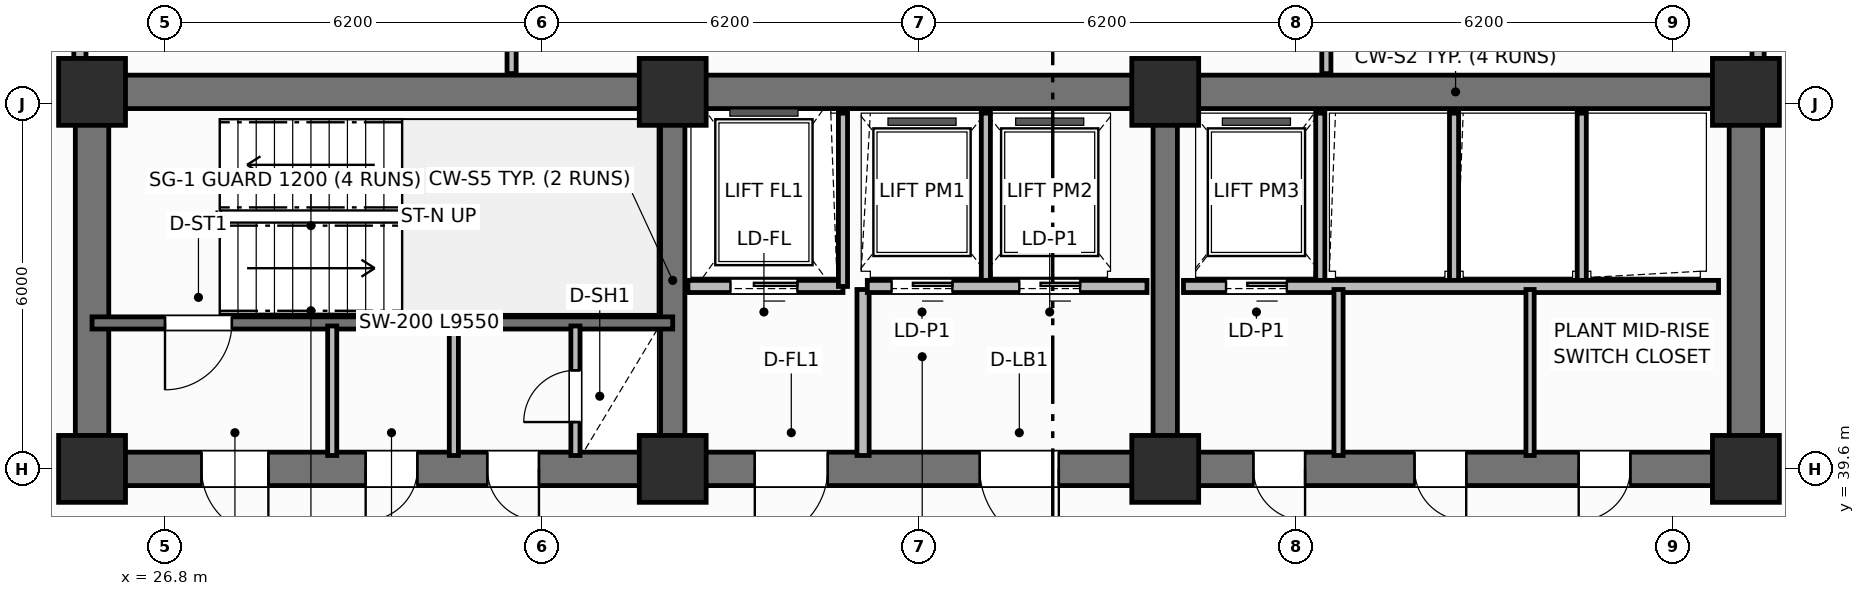
"""IFC4 building model, lengths in metres.
Left out: names, types, materials, properties, quantities, classifications, styles, units other than length and angle.
Written with IfcOpenShell. Run it as: python <this file> out.ifc"""

import sys

from ifc_helpers import new_model, si_unit, direction, frame, frame_2d, origin, origin_2d, place, context, subcontext, project, spatial, rectangle, extrude, element, fill, save


model = new_model("IFC4")
c1 = context("Model", 3, precision=1e-05, world=origin(), true_north=direction((0.0, 1.0)))
c2 = subcontext(c1, "Body", "Model", "MODEL_VIEW")
j1 = project(units=[si_unit("LENGTHUNIT", "METRE"), si_unit("PLANEANGLEUNIT", "RADIAN")], contexts=[c1])
p1 = place(None, origin())
s1 = spatial("IfcSite", under=j1, at=p1, CompositionType="ELEMENT")
p2 = place(p1, origin())
s2 = spatial("IfcBuilding", under=s1, at=p2, CompositionType="ELEMENT")
p3 = place(p2, frame((0.0, 0.0, 103.1)))
s3 = spatial("IfcBuildingStorey", under=s2, at=p3, CompositionType="ELEMENT", Elevation=103.1)
p4 = place(p3, frame((25.6, 45.8, 0.0), z_axis=(0.0, 0.0, 1.0), x_axis=(1.0, 0.0, 0.0)))
e1 = element("IfcWall", 1, at=p4, inside=s3, PredefinedType="SHEAR", context=c2, shape_type="SweptSolid", body=[
    extrude(rectangle(XDim=27.2, YDim=0.55, at=frame_2d((13.6, 0.0))), origin(), (0.0, 0.0, 1.0), 3.7),
])
for number, where, z_axis, x_axis in (
    (2, (25.6, 39.875, 0.0), (0.0, 0.0, 1.0), (0.0, 1.0, 0.0)),
    (3, (52.8, 39.875, 0.0), (0.0, 0.0, 1.0), (0.0, 1.0, 0.0)),
):
    element("IfcWall", number, at=place(p3, frame(where, z_axis=z_axis, x_axis=x_axis)), inside=s3, PredefinedType="SHEAR", context=c2, shape_type="SweptSolid", body=[
        extrude(rectangle(XDim=5.65, YDim=0.55, at=frame_2d((2.825, 0.0))), origin(), (0.0, 0.0, 1.0), 3.7),
    ])
p5 = place(p3, frame((52.8, 39.6, 0.0), z_axis=(0.0, 0.0, 1.0), x_axis=(-1.0, 0.0, 0.0)))
e4 = element("IfcWall", 4, at=p5, inside=s3, PredefinedType="SHEAR", context=c2, shape_type="SweptSolid", body=[
    extrude(rectangle(XDim=27.2, YDim=0.55, at=frame_2d((13.6, 0.0))), origin(), (0.0, 0.0, 1.0), 3.7),
])
p6 = place(p5, frame((24.3, 0.0, 0.0)))
e5 = element("IfcOpeningElement", 5, at=p6, cuts=e4, PredefinedType="OPENING", context=c2, shape_type="SweptSolid", body=[
    extrude(rectangle(XDim=1.1, YDim=2.15, at=frame_2d((0.55, 1.075))), frame((0.0, 0.285, 0.0), z_axis=(0.0, -1.0, 0.0), x_axis=(1.0, 0.0, 0.0)), (0.0, 0.0, 1.0), 0.57),
])
p7 = place(p5, frame((21.85, 0.0, 0.0)))
e6 = element("IfcOpeningElement", 6, at=p7, cuts=e4, PredefinedType="OPENING", context=c2, shape_type="SweptSolid", body=[
    extrude(rectangle(XDim=0.85, YDim=2.1, at=frame_2d((0.425, 1.05))), frame((0.0, 0.285, 0.0), z_axis=(0.0, -1.0, 0.0), x_axis=(1.0, 0.0, 0.0)), (0.0, 0.0, 1.0), 0.57),
])
p8 = place(p5, frame((19.85, 0.0, 0.0)))
e7 = element("IfcOpeningElement", 7, at=p8, cuts=e4, PredefinedType="OPENING", context=c2, shape_type="SweptSolid", body=[
    extrude(rectangle(XDim=0.85, YDim=2.1, at=frame_2d((0.425, 1.05))), frame((0.0, 0.285, 0.0), z_axis=(0.0, -1.0, 0.0), x_axis=(1.0, 0.0, 0.0)), (0.0, 0.0, 1.0), 0.57),
])
p9 = place(p5, frame((15.1, 0.0, 0.0)))
e8 = element("IfcOpeningElement", 8, at=p9, cuts=e4, PredefinedType="OPENING", context=c2, shape_type="SweptSolid", body=[
    extrude(rectangle(XDim=1.2, YDim=2.15, at=frame_2d((0.6, 1.075))), frame((0.0, 0.285, 0.0), z_axis=(0.0, -1.0, 0.0), x_axis=(1.0, 0.0, 0.0)), (0.0, 0.0, 1.0), 0.57),
])
p10 = place(p5, frame((11.3, 0.0, 0.0)))
e9 = element("IfcOpeningElement", 9, at=p10, cuts=e4, PredefinedType="OPENING", context=c2, shape_type="SweptSolid", body=[
    extrude(rectangle(XDim=1.3, YDim=2.2, at=frame_2d((0.65, 1.1))), frame((0.0, 0.285, 0.0), z_axis=(0.0, -1.0, 0.0), x_axis=(1.0, 0.0, 0.0)), (0.0, 0.0, 1.0), 0.57),
])
p11 = place(p5, frame((7.25, 0.0, 0.0)))
e10 = element("IfcOpeningElement", 10, at=p11, cuts=e4, PredefinedType="OPENING", context=c2, shape_type="SweptSolid", body=[
    extrude(rectangle(XDim=0.85, YDim=2.1, at=frame_2d((0.425, 1.05))), frame((0.0, 0.285, 0.0), z_axis=(0.0, -1.0, 0.0), x_axis=(1.0, 0.0, 0.0)), (0.0, 0.0, 1.0), 0.57),
])
p12 = place(p5, frame((4.6, 0.0, 0.0)))
e11 = element("IfcOpeningElement", 11, at=p12, cuts=e4, PredefinedType="OPENING", context=c2, shape_type="SweptSolid", body=[
    extrude(rectangle(XDim=0.85, YDim=2.1, at=frame_2d((0.425, 1.05))), frame((0.0, 0.285, 0.0), z_axis=(0.0, -1.0, 0.0), x_axis=(1.0, 0.0, 0.0)), (0.0, 0.0, 1.0), 0.57),
])
p13 = place(p5, frame((1.9, 0.0, 0.0)))
e12 = element("IfcOpeningElement", 12, at=p13, cuts=e4, PredefinedType="OPENING", context=c2, shape_type="SweptSolid", body=[
    extrude(rectangle(XDim=0.85, YDim=2.1, at=frame_2d((0.425, 1.05))), frame((0.0, 0.285, 0.0), z_axis=(0.0, -1.0, 0.0), x_axis=(1.0, 0.0, 0.0)), (0.0, 0.0, 1.0), 0.57),
])
for number, where, z_axis, x_axis in (
    (13, (35.15, 39.875, 0.0), (0.0, 0.0, 1.0), (0.0, 1.0, 0.0)),
    (14, (43.25, 39.875, 0.0), (0.0, 0.0, 1.0), (0.0, 1.0, 0.0)),
):
    element("IfcWall", number, at=place(p3, frame(where, z_axis=z_axis, x_axis=x_axis)), inside=s3, PredefinedType="SHEAR", context=c2, shape_type="SweptSolid", body=[
        extrude(rectangle(XDim=5.65, YDim=0.4, at=frame_2d((2.825, 0.0))), origin(), (0.0, 0.0, 1.0), 3.7),
    ])
for number, where, z_axis, x_axis in (
    (15, (25.6, 39.6, 0.0), (0.0, 0.0, 1.0), (1.0, 0.0, 0.0)),
    (16, (25.6, 45.8, 0.0), (0.0, 0.0, 1.0), (1.0, 0.0, 0.0)),
    (17, (35.15, 39.6, 0.0), (0.0, 0.0, 1.0), (1.0, 0.0, 0.0)),
    (18, (35.15, 45.8, 0.0), (0.0, 0.0, 1.0), (1.0, 0.0, 0.0)),
    (19, (43.25, 39.6, 0.0), (0.0, 0.0, 1.0), (1.0, 0.0, 0.0)),
    (20, (43.25, 45.8, 0.0), (0.0, 0.0, 1.0), (1.0, 0.0, 0.0)),
    (21, (52.8, 39.6, 0.0), (0.0, 0.0, 1.0), (1.0, 0.0, 0.0)),
    (22, (52.8, 45.8, 0.0), (0.0, 0.0, 1.0), (1.0, 0.0, 0.0)),
):
    element("IfcColumn", number, at=place(p3, frame(where, z_axis=z_axis, x_axis=x_axis)), inside=s3, PredefinedType="COLUMN", context=c2, shape_type="SweptSolid", body=[
        extrude(rectangle(XDim=1.1, YDim=1.1, at=origin_2d()), origin(), (0.0, 0.0, 1.0), 3.7),
    ])
p14 = place(p3, frame((35.15, 42.0, 0.0), z_axis=(0.0, 0.0, 1.0), x_axis=(-1.0, 0.0, 0.0)))
e23 = element("IfcWall", 23, at=p14, inside=s3, PredefinedType="SHEAR", context=c2, shape_type="SweptSolid", body=[
    extrude(rectangle(XDim=9.55, YDim=0.2, at=frame_2d((4.775, 0.0))), origin(), (0.0, 0.0, 1.0), 3.7),
])
p15 = place(p14, frame((7.25, 0.0, 0.0)))
e24 = element("IfcOpeningElement", 24, at=p15, cuts=e23, PredefinedType="OPENING", context=c2, shape_type="SweptSolid", body=[
    extrude(rectangle(XDim=1.1, YDim=2.15, at=frame_2d((0.55, 1.075))), frame((0.0, 0.11, 0.0), z_axis=(0.0, -1.0, 0.0), x_axis=(1.0, 0.0, 0.0)), (0.0, 0.0, 1.0), 0.22),
])
p16 = place(p3, frame((33.55, 39.82, 0.0), z_axis=(0.0, 0.0, 1.0), x_axis=(0.0, 1.0, 0.0)))
e25 = element("IfcWall", 25, at=p16, inside=s3, PredefinedType="PARTITIONING", context=c2, shape_type="SweptSolid", body=[
    extrude(rectangle(XDim=2.13, YDim=0.15, at=frame_2d((1.065, 0.0))), origin(), (0.0, 0.0, 1.0), 2.53),
])
p17 = place(p16, frame((0.55, 0.0, 0.0)))
e26 = element("IfcOpeningElement", 26, at=p17, cuts=e25, PredefinedType="OPENING", context=c2, shape_type="SweptSolid", body=[
    extrude(rectangle(XDim=0.85, YDim=2.05, at=frame_2d((0.425, 1.025))), frame((0.0, 0.085, 0.0), z_axis=(0.0, -1.0, 0.0), x_axis=(1.0, 0.0, 0.0)), (0.0, 0.0, 1.0), 0.17),
])
for number, where, z_axis, x_axis in (
    (27, (29.55, 39.82, 0.0), (0.0, 0.0, 1.0), (0.0, 1.0, 0.0)),
    (28, (31.55, 39.82, 0.0), (0.0, 0.0, 1.0), (0.0, 1.0, 0.0)),
):
    element("IfcWall", number, at=place(p3, frame(where, z_axis=z_axis, x_axis=x_axis)), inside=s3, PredefinedType="PARTITIONING", context=c2, shape_type="SweptSolid", body=[
        extrude(rectangle(XDim=2.13, YDim=0.15, at=frame_2d((1.065, 0.0))), origin(), (0.0, 0.0, 1.0), 2.53),
    ])
p18 = place(p3, frame((37.95, 42.6, 0.0), z_axis=(0.0, 0.0, 1.0), x_axis=(-1.0, 0.0, 0.0)))
e29 = element("IfcWall", 29, at=p18, inside=s3, PredefinedType="PARTITIONING", context=c2, shape_type="SweptSolid", body=[
    extrude(rectangle(XDim=2.55, YDim=0.2, at=frame_2d((1.275, 0.0))), origin(), (0.0, 0.0, 1.0), 2.3),
])
p19 = place(p18, frame((0.75, 0.0, 0.0)))
e30 = element("IfcOpeningElement", 30, at=p19, cuts=e29, PredefinedType="OPENING", context=c2, shape_type="SweptSolid", body=[
    extrude(rectangle(XDim=1.1, YDim=2.15, at=frame_2d((0.55, 1.075))), frame((0.0, 0.11, 0.0), z_axis=(0.0, -1.0, 0.0), x_axis=(1.0, 0.0, 0.0)), (0.0, 0.0, 1.0), 0.22),
])
p20 = place(p3, frame((37.95, 42.6, 0.0), z_axis=(0.0, 0.0, 1.0), x_axis=(0.0, 1.0, 0.0)))
e31 = element("IfcWall", 31, at=p20, inside=s3, PredefinedType="PARTITIONING", context=c2, shape_type="SweptSolid", body=[
    extrude(rectangle(XDim=2.85, YDim=0.15, at=frame_2d((1.425, 0.0))), origin(), (0.0, 0.0, 1.0), 2.53),
])
p21 = place(p3, frame((38.28, 39.82, 0.0), z_axis=(0.0, 0.0, 1.0), x_axis=(0.0, 1.0, 0.0)))
e32 = element("IfcWall", 32, at=p21, inside=s3, PredefinedType="PARTITIONING", context=c2, shape_type="SweptSolid", body=[
    extrude(rectangle(XDim=2.73, YDim=0.2, at=frame_2d((1.365, 0.0))), origin(), (0.0, 0.0, 1.0), 2.53),
])
p22 = place(p3, frame((40.3, 42.65, 0.0), z_axis=(0.0, 0.0, 1.0), x_axis=(0.0, 1.0, 0.0)))
e33 = element("IfcWall", 33, at=p22, inside=s3, PredefinedType="PARTITIONING", context=c2, shape_type="SweptSolid", body=[
    extrude(rectangle(XDim=2.8, YDim=0.15, at=frame_2d((1.4, 0.0))), origin(), (0.0, 0.0, 1.0), 2.53),
])
p23 = place(p3, frame((42.95, 42.6, 0.0), z_axis=(0.0, 0.0, 1.0), x_axis=(-1.0, 0.0, 0.0)))
e34 = element("IfcWall", 34, at=p23, inside=s3, PredefinedType="PARTITIONING", context=c2, shape_type="SweptSolid", body=[
    extrude(rectangle(XDim=4.6, YDim=0.2, at=frame_2d((2.3, 0.0))), origin(), (0.0, 0.0, 1.0), 2.3),
])
p24 = place(p23, frame((3.2, 0.0, 0.0)))
e35 = element("IfcOpeningElement", 35, at=p24, cuts=e34, PredefinedType="OPENING", context=c2, shape_type="SweptSolid", body=[
    extrude(rectangle(XDim=1.0, YDim=2.15, at=frame_2d((0.5, 1.075))), frame((0.0, 0.11, 0.0), z_axis=(0.0, -1.0, 0.0), x_axis=(1.0, 0.0, 0.0)), (0.0, 0.0, 1.0), 0.22),
])
p25 = place(p23, frame((1.1, 0.0, 0.0)))
e36 = element("IfcOpeningElement", 36, at=p25, cuts=e34, PredefinedType="OPENING", context=c2, shape_type="SweptSolid", body=[
    extrude(rectangle(XDim=1.0, YDim=2.15, at=frame_2d((0.5, 1.075))), frame((0.0, 0.11, 0.0), z_axis=(0.0, -1.0, 0.0), x_axis=(1.0, 0.0, 0.0)), (0.0, 0.0, 1.0), 0.22),
])
for number, where, z_axis, x_axis in (
    (37, (45.8, 42.65, 0.0), (0.0, 0.0, 1.0), (0.0, 1.0, 0.0)),
    (38, (48.0, 42.65, 0.0), (0.0, 0.0, 1.0), (0.0, 1.0, 0.0)),
    (39, (50.1, 42.65, 0.0), (0.0, 0.0, 1.0), (0.0, 1.0, 0.0)),
):
    element("IfcWall", number, at=place(p3, frame(where, z_axis=z_axis, x_axis=x_axis)), inside=s3, PredefinedType="PARTITIONING", context=c2, shape_type="SweptSolid", body=[
        extrude(rectangle(XDim=2.8, YDim=0.15, at=frame_2d((1.4, 0.0))), origin(), (0.0, 0.0, 1.0), 2.53),
    ])
p26 = place(p3, frame((52.35, 42.6, 0.0), z_axis=(0.0, 0.0, 1.0), x_axis=(-1.0, 0.0, 0.0)))
e40 = element("IfcWall", 40, at=p26, inside=s3, PredefinedType="PARTITIONING", context=c2, shape_type="SweptSolid", body=[
    extrude(rectangle(XDim=8.8, YDim=0.2, at=frame_2d((4.4, 0.0))), origin(), (0.0, 0.0, 1.0), 2.53),
])
p27 = place(p26, frame((7.1, 0.0, 0.0)))
e41 = element("IfcOpeningElement", 41, at=p27, cuts=e40, PredefinedType="OPENING", context=c2, shape_type="SweptSolid", body=[
    extrude(rectangle(XDim=1.0, YDim=2.15, at=frame_2d((0.5, 1.075))), frame((0.0, 0.11, 0.0), z_axis=(0.0, -1.0, 0.0), x_axis=(1.0, 0.0, 0.0)), (0.0, 0.0, 1.0), 0.22),
])
p28 = place(p3, frame((46.1, 39.82, 0.0), z_axis=(0.0, 0.0, 1.0), x_axis=(0.0, 1.0, 0.0)))
e42 = element("IfcWall", 42, at=p28, inside=s3, PredefinedType="PARTITIONING", context=c2, shape_type="SweptSolid", body=[
    extrude(rectangle(XDim=2.73, YDim=0.15, at=frame_2d((1.365, 0.0))), origin(), (0.0, 0.0, 1.0), 2.53),
])
p29 = place(p3, frame((49.25, 39.82, 0.0), z_axis=(0.0, 0.0, 1.0), x_axis=(0.0, 1.0, 0.0)))
e43 = element("IfcWall", 43, at=p29, inside=s3, PredefinedType="PARTITIONING", context=c2, shape_type="SweptSolid", body=[
    extrude(rectangle(XDim=2.73, YDim=0.135, at=frame_2d((1.365, 0.0))), origin(), (0.0, 0.0, 1.0), 2.53),
])
p30 = place(p3, frame((32.5, 46.1, 0.0), z_axis=(0.0, 0.0, 1.0), x_axis=(0.0, 1.0, 0.0)))
e44 = element("IfcWall", 44, at=p30, inside=s3, PredefinedType="PARTITIONING", context=c2, shape_type="SweptSolid", body=[
    extrude(rectangle(XDim=5.33, YDim=0.15, at=frame_2d((2.665, 0.0))), origin(), (0.0, 0.0, 1.0), 2.53),
])
p31 = place(p30, frame((0.85, 0.0, 0.0)))
e45 = element("IfcOpeningElement", 45, at=p31, cuts=e44, PredefinedType="OPENING", context=c2, shape_type="SweptSolid", body=[
    extrude(rectangle(XDim=0.9, YDim=2.1, at=frame_2d((0.45, 1.05))), frame((0.0, 0.085, 0.0), z_axis=(0.0, -1.0, 0.0), x_axis=(1.0, 0.0, 0.0)), (0.0, 0.0, 1.0), 0.17),
])
p32 = place(p3, frame((45.9, 46.1, 0.0), z_axis=(0.0, 0.0, 1.0), x_axis=(0.0, 1.0, 0.0)))
e46 = element("IfcWall", 46, at=p32, inside=s3, PredefinedType="PARTITIONING", context=c2, shape_type="SweptSolid", body=[
    extrude(rectangle(XDim=5.33, YDim=0.15, at=frame_2d((2.665, 0.0))), origin(), (0.0, 0.0, 1.0), 2.53),
])
p33 = place(p3, frame((25.4, 46.1, 0.0), z_axis=(0.0, 0.0, 1.0), x_axis=(0.0, 1.0, 0.0)))
e47 = element("IfcWall", 47, at=p33, inside=s3, PredefinedType="PARTITIONING", context=c2, shape_type="SweptSolid", body=[
    extrude(rectangle(XDim=4.33, YDim=0.2, at=frame_2d((2.165, 0.0))), origin(), (0.0, 0.0, 1.0), 2.53),
])
p34 = place(p33, frame((1.05, 0.0, 0.0)))
e48 = element("IfcOpeningElement", 48, at=p34, cuts=e47, PredefinedType="OPENING", context=c2, shape_type="SweptSolid", body=[
    extrude(rectangle(XDim=0.9, YDim=2.1, at=frame_2d((0.45, 1.05))), frame((0.0, 0.11, 0.0), z_axis=(0.0, -1.0, 0.0), x_axis=(1.0, 0.0, 0.0)), (0.0, 0.0, 1.0), 0.22),
])
p35 = place(p3, frame((53.0, 46.1, 0.0), z_axis=(0.0, 0.0, 1.0), x_axis=(0.0, 1.0, 0.0)))
e49 = element("IfcWall", 49, at=p35, inside=s3, PredefinedType="PARTITIONING", context=c2, shape_type="SweptSolid", body=[
    extrude(rectangle(XDim=4.33, YDim=0.2, at=frame_2d((2.165, 0.0))), origin(), (0.0, 0.0, 1.0), 2.53),
])
p36 = place(p35, frame((1.05, 0.0, 0.0)))
e50 = element("IfcOpeningElement", 50, at=p36, cuts=e49, PredefinedType="OPENING", context=c2, shape_type="SweptSolid", body=[
    extrude(rectangle(XDim=0.9, YDim=2.1, at=frame_2d((0.45, 1.05))), frame((0.0, 0.11, 0.0), z_axis=(0.0, -1.0, 0.0), x_axis=(1.0, 0.0, 0.0)), (0.0, 0.0, 1.0), 0.22),
])
p37 = place(p15, origin())
e51 = element("IfcDoor", 51, at=p37, inside=s3, OperationType="SINGLE_SWING_RIGHT", PredefinedType="DOOR", context=c2, shape_type="SweptSolid", body=[
    extrude(rectangle(XDim=1.1, YDim=2.15, at=frame_2d((0.55, 1.075))), frame((0.0, 0.025, 0.0), z_axis=(0.0, -1.0, 0.0), x_axis=(1.0, 0.0, 0.0)), (0.0, 0.0, 1.0), 0.05),
])
fill(e24, e51)
p38 = place(p17, origin())
e52 = element("IfcDoor", 52, at=p38, inside=s3, OperationType="SINGLE_SWING_LEFT", PredefinedType="TRAPDOOR", context=c2, shape_type="SweptSolid", body=[
    extrude(rectangle(XDim=0.85, YDim=2.05, at=frame_2d((0.425, 1.025))), frame((0.0, 0.025, 0.0), z_axis=(0.0, -1.0, 0.0), x_axis=(1.0, 0.0, 0.0)), (0.0, 0.0, 1.0), 0.05),
])
fill(e26, e52)
p39 = place(p19, origin())
e53 = element("IfcDoor", 53, at=p39, inside=s3, OperationType="SLIDING_TO_LEFT", PredefinedType="DOOR", context=c2, shape_type="SweptSolid", body=[
    extrude(rectangle(XDim=1.1, YDim=2.15, at=frame_2d((0.55, 1.075))), frame((0.0, 0.025, 0.0), z_axis=(0.0, -1.0, 0.0), x_axis=(1.0, 0.0, 0.0)), (0.0, 0.0, 1.0), 0.05),
])
fill(e30, e53)
p40 = place(p24, origin())
e54 = element("IfcDoor", 54, at=p40, inside=s3, OperationType="SLIDING_TO_LEFT", PredefinedType="DOOR", context=c2, shape_type="SweptSolid", body=[
    extrude(rectangle(XDim=1.0, YDim=2.15, at=frame_2d((0.5, 1.075))), frame((0.0, 0.025, 0.0), z_axis=(0.0, -1.0, 0.0), x_axis=(1.0, 0.0, 0.0)), (0.0, 0.0, 1.0), 0.05),
])
fill(e35, e54)
p41 = place(p25, origin())
e55 = element("IfcDoor", 55, at=p41, inside=s3, OperationType="SLIDING_TO_LEFT", PredefinedType="DOOR", context=c2, shape_type="SweptSolid", body=[
    extrude(rectangle(XDim=1.0, YDim=2.15, at=frame_2d((0.5, 1.075))), frame((0.0, 0.025, 0.0), z_axis=(0.0, -1.0, 0.0), x_axis=(1.0, 0.0, 0.0)), (0.0, 0.0, 1.0), 0.05),
])
fill(e36, e55)
p42 = place(p27, origin())
e56 = element("IfcDoor", 56, at=p42, inside=s3, OperationType="SLIDING_TO_LEFT", PredefinedType="DOOR", context=c2, shape_type="SweptSolid", body=[
    extrude(rectangle(XDim=1.0, YDim=2.15, at=frame_2d((0.5, 1.075))), frame((0.0, 0.025, 0.0), z_axis=(0.0, -1.0, 0.0), x_axis=(1.0, 0.0, 0.0)), (0.0, 0.0, 1.0), 0.05),
])
fill(e41, e56)
p43 = place(p6, origin())
e57 = element("IfcDoor", 57, at=p43, inside=s3, OperationType="SINGLE_SWING_LEFT", PredefinedType="DOOR", context=c2, shape_type="SweptSolid", body=[
    extrude(rectangle(XDim=1.1, YDim=2.15, at=frame_2d((0.55, 1.075))), frame((0.0, 0.025, 0.0), z_axis=(0.0, -1.0, 0.0), x_axis=(1.0, 0.0, 0.0)), (0.0, 0.0, 1.0), 0.05),
])
fill(e5, e57)
p44 = place(p7, origin())
e58 = element("IfcDoor", 58, at=p44, inside=s3, OperationType="SINGLE_SWING_RIGHT", PredefinedType="DOOR", context=c2, shape_type="SweptSolid", body=[
    extrude(rectangle(XDim=0.85, YDim=2.1, at=frame_2d((0.425, 1.05))), frame((0.0, 0.025, 0.0), z_axis=(0.0, -1.0, 0.0), x_axis=(1.0, 0.0, 0.0)), (0.0, 0.0, 1.0), 0.05),
])
fill(e6, e58)
p45 = place(p8, origin())
e59 = element("IfcDoor", 59, at=p45, inside=s3, OperationType="SINGLE_SWING_LEFT", PredefinedType="DOOR", context=c2, shape_type="SweptSolid", body=[
    extrude(rectangle(XDim=0.85, YDim=2.1, at=frame_2d((0.425, 1.05))), frame((0.0, 0.025, 0.0), z_axis=(0.0, -1.0, 0.0), x_axis=(1.0, 0.0, 0.0)), (0.0, 0.0, 1.0), 0.05),
])
fill(e7, e59)
p46 = place(p9, origin())
e60 = element("IfcDoor", 60, at=p46, inside=s3, OperationType="SINGLE_SWING_RIGHT", PredefinedType="DOOR", context=c2, shape_type="SweptSolid", body=[
    extrude(rectangle(XDim=1.2, YDim=2.15, at=frame_2d((0.6, 1.075))), frame((0.0, 0.025, 0.0), z_axis=(0.0, -1.0, 0.0), x_axis=(1.0, 0.0, 0.0)), (0.0, 0.0, 1.0), 0.05),
])
fill(e8, e60)
p47 = place(p10, origin())
e61 = element("IfcDoor", 61, at=p47, inside=s3, OperationType="SINGLE_SWING_LEFT", PredefinedType="DOOR", context=c2, shape_type="SweptSolid", body=[
    extrude(rectangle(XDim=1.3, YDim=2.2, at=frame_2d((0.65, 1.1))), frame((0.0, 0.025, 0.0), z_axis=(0.0, -1.0, 0.0), x_axis=(1.0, 0.0, 0.0)), (0.0, 0.0, 1.0), 0.05),
])
fill(e9, e61)
p48 = place(p11, origin())
e62 = element("IfcDoor", 62, at=p48, inside=s3, OperationType="SINGLE_SWING_LEFT", PredefinedType="DOOR", context=c2, shape_type="SweptSolid", body=[
    extrude(rectangle(XDim=0.85, YDim=2.1, at=frame_2d((0.425, 1.05))), frame((0.0, 0.025, 0.0), z_axis=(0.0, -1.0, 0.0), x_axis=(1.0, 0.0, 0.0)), (0.0, 0.0, 1.0), 0.05),
])
fill(e10, e62)
p49 = place(p12, origin())
e63 = element("IfcDoor", 63, at=p49, inside=s3, OperationType="SINGLE_SWING_LEFT", PredefinedType="DOOR", context=c2, shape_type="SweptSolid", body=[
    extrude(rectangle(XDim=0.85, YDim=2.1, at=frame_2d((0.425, 1.05))), frame((0.0, 0.025, 0.0), z_axis=(0.0, -1.0, 0.0), x_axis=(1.0, 0.0, 0.0)), (0.0, 0.0, 1.0), 0.05),
])
fill(e11, e63)
p50 = place(p13, origin())
e64 = element("IfcDoor", 64, at=p50, inside=s3, OperationType="SINGLE_SWING_RIGHT", PredefinedType="DOOR", context=c2, shape_type="SweptSolid", body=[
    extrude(rectangle(XDim=0.85, YDim=2.1, at=frame_2d((0.425, 1.05))), frame((0.0, 0.025, 0.0), z_axis=(0.0, -1.0, 0.0), x_axis=(1.0, 0.0, 0.0)), (0.0, 0.0, 1.0), 0.05),
])
fill(e12, e64)
save(model, sys.argv[1])
